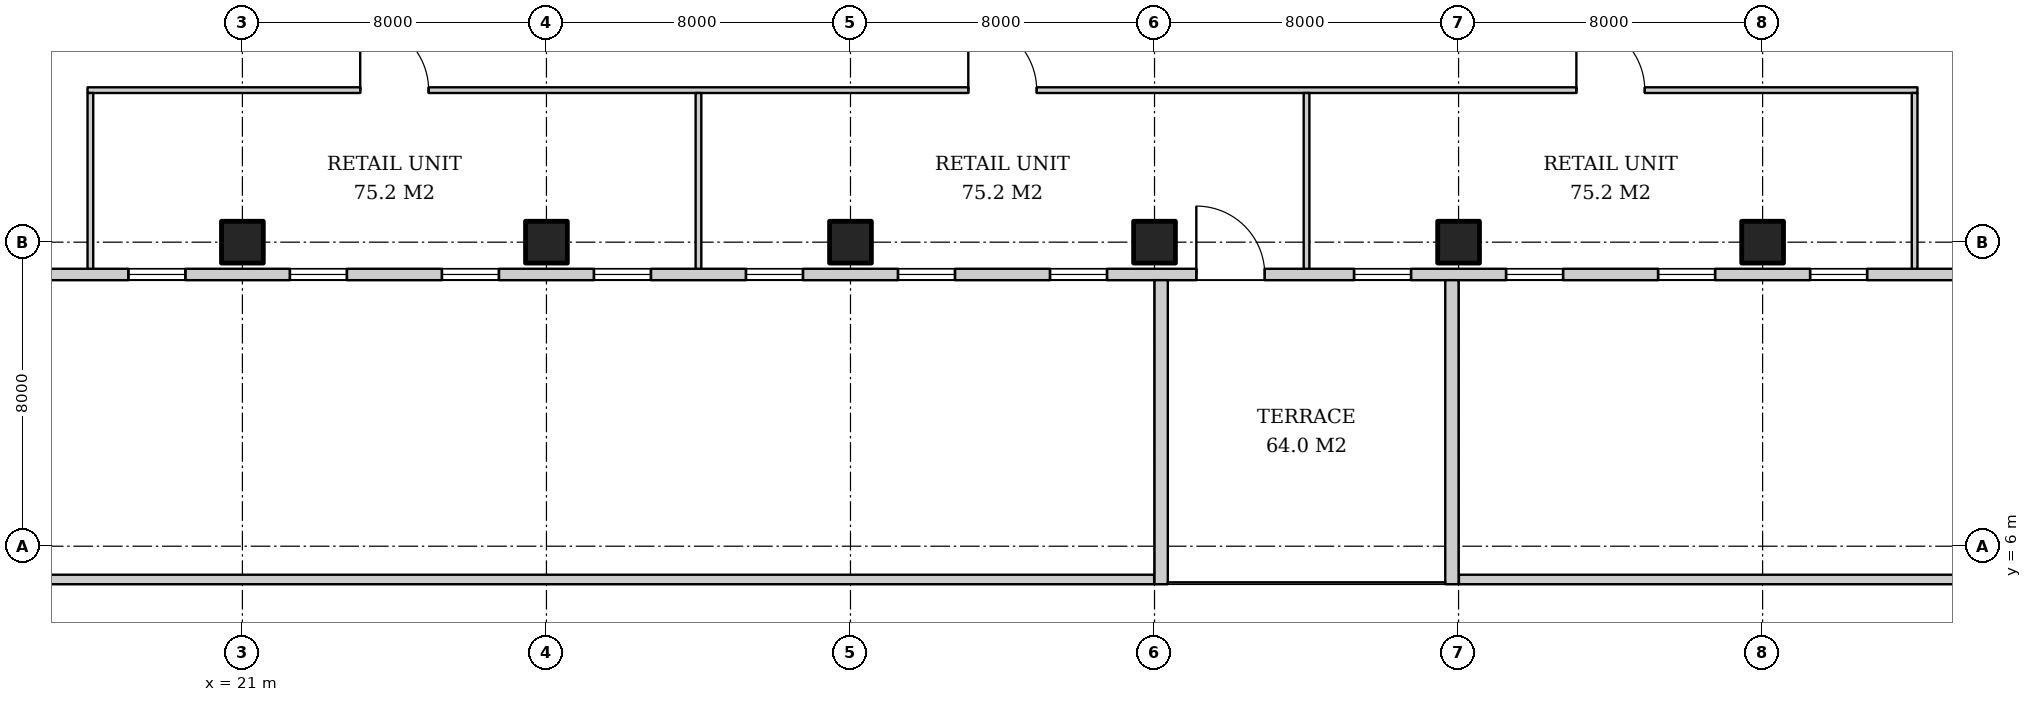
"""IFC4 building model, lengths in metres.
Left out: names, types, materials, properties, quantities, classifications, styles, units other than length and angle.
Written with IfcOpenShell. Run it as: python <this file> out.ifc"""

import sys

from ifc_helpers import new_model, si_unit, direction, frame, frame_2d, origin, origin_2d, place, context, subcontext, project, spatial, rectangle, extrude, element, fill, save


model = new_model("IFC4")
c1 = context("Model", 3, precision=1e-05, world=origin(), true_north=direction((0.0, 1.0)))
c2 = subcontext(c1, "Body", "Model", "MODEL_VIEW")
j1 = project(units=[si_unit("LENGTHUNIT", "METRE"), si_unit("PLANEANGLEUNIT", "RADIAN")], contexts=[c1])
p1 = place(None, origin())
s1 = spatial("IfcSite", under=j1, at=p1, CompositionType="ELEMENT")
p2 = place(p1, origin())
s2 = spatial("IfcBuilding", under=s1, at=p2, CompositionType="ELEMENT")
p3 = place(p2, frame((0.0, 0.0, 6.0)))
s3 = spatial("IfcBuildingStorey", under=s2, at=p3, CompositionType="ELEMENT", Elevation=6.0)
for number, where, z_axis, x_axis in (
    (1, (21.0, 14.0, 0.0), (0.0, 0.0, 1.0), (1.0, 0.0, 0.0)),
    (2, (29.0, 14.0, 0.0), (0.0, 0.0, 1.0), (1.0, 0.0, 0.0)),
    (3, (37.0, 14.0, 0.0), (0.0, 0.0, 1.0), (1.0, 0.0, 0.0)),
    (4, (45.0, 14.0, 0.0), (0.0, 0.0, 1.0), (1.0, 0.0, 0.0)),
    (5, (53.0, 14.0, 0.0), (0.0, 0.0, 1.0), (1.0, 0.0, 0.0)),
    (6, (61.0, 14.0, 0.0), (0.0, 0.0, 1.0), (1.0, 0.0, 0.0)),
):
    element("IfcColumn", number, at=place(p3, frame(where, z_axis=z_axis, x_axis=x_axis)), inside=s3, PredefinedType="COLUMN", context=c2, shape_type="SweptSolid", body=[
        extrude(rectangle(XDim=1.1, YDim=1.1, at=origin_2d()), origin(), (0.0, 0.0, 1.0), 5.0),
    ])
p4 = place(p3, frame((12.0, 13.15, 0.0), z_axis=(0.0, 0.0, 1.0), x_axis=(1.0, 0.0, 0.0)))
e7 = element("IfcWall", 7, at=p4, inside=s3, PredefinedType="SOLIDWALL", context=c2, shape_type="SweptSolid", body=[
    extrude(rectangle(XDim=66.0, YDim=0.3, at=frame_2d((33.0, 0.0))), origin(), (0.0, 0.0, 1.0), 4.7),
])
p5 = place(p4, frame((1.5, 0.0, 0.9)))
e8 = element("IfcOpeningElement", 8, at=p5, cuts=e7, PredefinedType="OPENING", context=c2, shape_type="SweptSolid", body=[
    extrude(rectangle(XDim=1.5, YDim=3.2, at=frame_2d((0.75, 1.6))), frame((0.0, 0.16, 0.0), z_axis=(0.0, -1.0, 0.0), x_axis=(1.0, 0.0, 0.0)), (0.0, 0.0, 1.0), 0.32),
])
p6 = place(p4, frame((6.0, 0.0, 0.9)))
e9 = element("IfcOpeningElement", 9, at=p6, cuts=e7, PredefinedType="OPENING", context=c2, shape_type="SweptSolid", body=[
    extrude(rectangle(XDim=1.5, YDim=3.2, at=frame_2d((0.75, 1.6))), frame((0.0, 0.16, 0.0), z_axis=(0.0, -1.0, 0.0), x_axis=(1.0, 0.0, 0.0)), (0.0, 0.0, 1.0), 0.32),
])
p7 = place(p4, frame((10.25, 0.0, 0.9)))
e10 = element("IfcOpeningElement", 10, at=p7, cuts=e7, PredefinedType="OPENING", context=c2, shape_type="SweptSolid", body=[
    extrude(rectangle(XDim=1.5, YDim=3.2, at=frame_2d((0.75, 1.6))), frame((0.0, 0.16, 0.0), z_axis=(0.0, -1.0, 0.0), x_axis=(1.0, 0.0, 0.0)), (0.0, 0.0, 1.0), 0.32),
])
p8 = place(p4, frame((14.25, 0.0, 0.9)))
e11 = element("IfcOpeningElement", 11, at=p8, cuts=e7, PredefinedType="OPENING", context=c2, shape_type="SweptSolid", body=[
    extrude(rectangle(XDim=1.5, YDim=3.2, at=frame_2d((0.75, 1.6))), frame((0.0, 0.16, 0.0), z_axis=(0.0, -1.0, 0.0), x_axis=(1.0, 0.0, 0.0)), (0.0, 0.0, 1.0), 0.32),
])
p9 = place(p4, frame((18.25, 0.0, 0.9)))
e12 = element("IfcOpeningElement", 12, at=p9, cuts=e7, PredefinedType="OPENING", context=c2, shape_type="SweptSolid", body=[
    extrude(rectangle(XDim=1.5, YDim=3.2, at=frame_2d((0.75, 1.6))), frame((0.0, 0.16, 0.0), z_axis=(0.0, -1.0, 0.0), x_axis=(1.0, 0.0, 0.0)), (0.0, 0.0, 1.0), 0.32),
])
p10 = place(p4, frame((22.25, 0.0, 0.9)))
e13 = element("IfcOpeningElement", 13, at=p10, cuts=e7, PredefinedType="OPENING", context=c2, shape_type="SweptSolid", body=[
    extrude(rectangle(XDim=1.5, YDim=3.2, at=frame_2d((0.75, 1.6))), frame((0.0, 0.16, 0.0), z_axis=(0.0, -1.0, 0.0), x_axis=(1.0, 0.0, 0.0)), (0.0, 0.0, 1.0), 0.32),
])
p11 = place(p4, frame((26.25, 0.0, 0.9)))
e14 = element("IfcOpeningElement", 14, at=p11, cuts=e7, PredefinedType="OPENING", context=c2, shape_type="SweptSolid", body=[
    extrude(rectangle(XDim=1.5, YDim=3.2, at=frame_2d((0.75, 1.6))), frame((0.0, 0.16, 0.0), z_axis=(0.0, -1.0, 0.0), x_axis=(1.0, 0.0, 0.0)), (0.0, 0.0, 1.0), 0.32),
])
p12 = place(p4, frame((30.25, 0.0, 0.9)))
e15 = element("IfcOpeningElement", 15, at=p12, cuts=e7, PredefinedType="OPENING", context=c2, shape_type="SweptSolid", body=[
    extrude(rectangle(XDim=1.5, YDim=3.2, at=frame_2d((0.75, 1.6))), frame((0.0, 0.16, 0.0), z_axis=(0.0, -1.0, 0.0), x_axis=(1.0, 0.0, 0.0)), (0.0, 0.0, 1.0), 0.32),
])
p13 = place(p4, frame((34.1, 0.0, 0.0)))
e16 = element("IfcOpeningElement", 16, at=p13, cuts=e7, PredefinedType="OPENING", context=c2, shape_type="SweptSolid", body=[
    extrude(rectangle(XDim=1.8, YDim=2.4, at=frame_2d((0.9, 1.2))), frame((0.0, 0.16, 0.0), z_axis=(0.0, -1.0, 0.0), x_axis=(1.0, 0.0, 0.0)), (0.0, 0.0, 1.0), 0.32),
])
p14 = place(p4, frame((38.25, 0.0, 0.9)))
e17 = element("IfcOpeningElement", 17, at=p14, cuts=e7, PredefinedType="OPENING", context=c2, shape_type="SweptSolid", body=[
    extrude(rectangle(XDim=1.5, YDim=3.2, at=frame_2d((0.75, 1.6))), frame((0.0, 0.16, 0.0), z_axis=(0.0, -1.0, 0.0), x_axis=(1.0, 0.0, 0.0)), (0.0, 0.0, 1.0), 0.32),
])
p15 = place(p4, frame((42.25, 0.0, 0.9)))
e18 = element("IfcOpeningElement", 18, at=p15, cuts=e7, PredefinedType="OPENING", context=c2, shape_type="SweptSolid", body=[
    extrude(rectangle(XDim=1.5, YDim=3.2, at=frame_2d((0.75, 1.6))), frame((0.0, 0.16, 0.0), z_axis=(0.0, -1.0, 0.0), x_axis=(1.0, 0.0, 0.0)), (0.0, 0.0, 1.0), 0.32),
])
p16 = place(p4, frame((46.25, 0.0, 0.9)))
e19 = element("IfcOpeningElement", 19, at=p16, cuts=e7, PredefinedType="OPENING", context=c2, shape_type="SweptSolid", body=[
    extrude(rectangle(XDim=1.5, YDim=3.2, at=frame_2d((0.75, 1.6))), frame((0.0, 0.16, 0.0), z_axis=(0.0, -1.0, 0.0), x_axis=(1.0, 0.0, 0.0)), (0.0, 0.0, 1.0), 0.32),
])
p17 = place(p4, frame((50.25, 0.0, 0.9)))
e20 = element("IfcOpeningElement", 20, at=p17, cuts=e7, PredefinedType="OPENING", context=c2, shape_type="SweptSolid", body=[
    extrude(rectangle(XDim=1.5, YDim=3.2, at=frame_2d((0.75, 1.6))), frame((0.0, 0.16, 0.0), z_axis=(0.0, -1.0, 0.0), x_axis=(1.0, 0.0, 0.0)), (0.0, 0.0, 1.0), 0.32),
])
p18 = place(p4, frame((54.25, 0.0, 0.9)))
e21 = element("IfcOpeningElement", 21, at=p18, cuts=e7, PredefinedType="OPENING", context=c2, shape_type="SweptSolid", body=[
    extrude(rectangle(XDim=1.5, YDim=3.2, at=frame_2d((0.75, 1.6))), frame((0.0, 0.16, 0.0), z_axis=(0.0, -1.0, 0.0), x_axis=(1.0, 0.0, 0.0)), (0.0, 0.0, 1.0), 0.32),
])
p19 = place(p4, frame((58.5, 0.0, 0.9)))
e22 = element("IfcOpeningElement", 22, at=p19, cuts=e7, PredefinedType="OPENING", context=c2, shape_type="SweptSolid", body=[
    extrude(rectangle(XDim=1.5, YDim=3.2, at=frame_2d((0.75, 1.6))), frame((0.0, 0.16, 0.0), z_axis=(0.0, -1.0, 0.0), x_axis=(1.0, 0.0, 0.0)), (0.0, 0.0, 1.0), 0.32),
])
p20 = place(p4, frame((63.0, 0.0, 0.9)))
e23 = element("IfcOpeningElement", 23, at=p20, cuts=e7, PredefinedType="OPENING", context=c2, shape_type="SweptSolid", body=[
    extrude(rectangle(XDim=1.5, YDim=3.2, at=frame_2d((0.75, 1.6))), frame((0.0, 0.16, 0.0), z_axis=(0.0, -1.0, 0.0), x_axis=(1.0, 0.0, 0.0)), (0.0, 0.0, 1.0), 0.32),
])
p21 = place(p3, frame((4.0, 5.125, 0.0), z_axis=(0.0, 0.0, 1.0), x_axis=(1.0, 0.0, 0.0)))
e24 = element("IfcWall", 24, at=p21, inside=s3, PredefinedType="PARAPET", context=c2, shape_type="SweptSolid", body=[
    extrude(rectangle(XDim=40.99, YDim=0.25, at=frame_2d((20.495, 0.0))), origin(), (0.0, 0.0, 1.0), 1.1),
])
p22 = place(p3, frame((53.01, 5.125, 0.0), z_axis=(0.0, 0.0, 1.0), x_axis=(1.0, 0.0, 0.0)))
e25 = element("IfcWall", 25, at=p22, inside=s3, PredefinedType="PARAPET", context=c2, shape_type="SweptSolid", body=[
    extrude(rectangle(XDim=24.99, YDim=0.25, at=frame_2d((12.495, 0.0))), origin(), (0.0, 0.0, 1.0), 1.1),
])
for number, where, z_axis, x_axis in (
    (26, (45.175, 5.0, 0.0), (0.0, 0.0, 1.0), (0.0, 1.0, 0.0)),
    (27, (52.825, 5.0, 0.0), (0.0, 0.0, 1.0), (0.0, 1.0, 0.0)),
):
    element("IfcWall", number, at=place(p3, frame(where, z_axis=z_axis, x_axis=x_axis)), inside=s3, PredefinedType="PARAPET", context=c2, shape_type="SweptSolid", body=[
        extrude(rectangle(XDim=8.0, YDim=0.35, at=frame_2d((4.0, 0.0))), origin(), (0.0, 0.0, 1.0), 1.1),
    ])
p23 = place(p3, frame((16.925, 18.0, 0.0), z_axis=(0.0, 0.0, 1.0), x_axis=(1.0, 0.0, 0.0)))
e28 = element("IfcWall", 28, at=p23, inside=s3, PredefinedType="PARTITIONING", context=c2, shape_type="SweptSolid", body=[
    extrude(rectangle(XDim=48.15, YDim=0.15, at=frame_2d((24.075, 0.0))), origin(), (0.0, 0.0, 1.0), 3.2),
])
p24 = place(p23, frame((7.175, 0.0, 0.0)))
e29 = element("IfcOpeningElement", 29, at=p24, cuts=e28, PredefinedType="OPENING", context=c2, shape_type="SweptSolid", body=[
    extrude(rectangle(XDim=1.8, YDim=2.4, at=frame_2d((0.9, 1.2))), frame((0.0, 0.085, 0.0), z_axis=(0.0, -1.0, 0.0), x_axis=(1.0, 0.0, 0.0)), (0.0, 0.0, 1.0), 0.17),
])
p25 = place(p23, frame((23.175, 0.0, 0.0)))
e30 = element("IfcOpeningElement", 30, at=p25, cuts=e28, PredefinedType="OPENING", context=c2, shape_type="SweptSolid", body=[
    extrude(rectangle(XDim=1.8, YDim=2.4, at=frame_2d((0.9, 1.2))), frame((0.0, 0.085, 0.0), z_axis=(0.0, -1.0, 0.0), x_axis=(1.0, 0.0, 0.0)), (0.0, 0.0, 1.0), 0.17),
])
p26 = place(p23, frame((39.175, 0.0, 0.0)))
e31 = element("IfcOpeningElement", 31, at=p26, cuts=e28, PredefinedType="OPENING", context=c2, shape_type="SweptSolid", body=[
    extrude(rectangle(XDim=1.8, YDim=2.4, at=frame_2d((0.9, 1.2))), frame((0.0, 0.085, 0.0), z_axis=(0.0, -1.0, 0.0), x_axis=(1.0, 0.0, 0.0)), (0.0, 0.0, 1.0), 0.17),
])
for number, where, z_axis, x_axis in (
    (32, (17.0, 17.925, 0.0), (0.0, 0.0, 1.0), (0.0, -1.0, 0.0)),
    (33, (33.0, 17.925, 0.0), (0.0, 0.0, 1.0), (0.0, -1.0, 0.0)),
    (34, (49.0, 17.925, 0.0), (0.0, 0.0, 1.0), (0.0, -1.0, 0.0)),
    (35, (65.0, 17.925, 0.0), (0.0, 0.0, 1.0), (0.0, -1.0, 0.0)),
):
    element("IfcWall", number, at=place(p3, frame(where, z_axis=z_axis, x_axis=x_axis)), inside=s3, PredefinedType="PARTITIONING", context=c2, shape_type="SweptSolid", body=[
        extrude(rectangle(XDim=4.625, YDim=0.15, at=frame_2d((2.312, 0.0))), origin(), (0.0, 0.0, 1.0), 3.2),
    ])
p27 = place(p6, origin())
e36 = element("IfcWindow", 36, at=p27, inside=s3, PartitioningType="SINGLE_PANEL", PredefinedType="WINDOW", context=c2, shape_type="SweptSolid", body=[
    extrude(rectangle(XDim=1.5, YDim=3.2, at=frame_2d((0.75, 1.6))), frame((0.0, 0.03, 0.0), z_axis=(0.0, -1.0, 0.0), x_axis=(1.0, 0.0, 0.0)), (0.0, 0.0, 1.0), 0.06),
])
fill(e9, e36)
p28 = place(p7, origin())
e37 = element("IfcWindow", 37, at=p28, inside=s3, PartitioningType="SINGLE_PANEL", PredefinedType="WINDOW", context=c2, shape_type="SweptSolid", body=[
    extrude(rectangle(XDim=1.5, YDim=3.2, at=frame_2d((0.75, 1.6))), frame((0.0, 0.03, 0.0), z_axis=(0.0, -1.0, 0.0), x_axis=(1.0, 0.0, 0.0)), (0.0, 0.0, 1.0), 0.06),
])
fill(e10, e37)
p29 = place(p8, origin())
e38 = element("IfcWindow", 38, at=p29, inside=s3, PartitioningType="SINGLE_PANEL", PredefinedType="WINDOW", context=c2, shape_type="SweptSolid", body=[
    extrude(rectangle(XDim=1.5, YDim=3.2, at=frame_2d((0.75, 1.6))), frame((0.0, 0.03, 0.0), z_axis=(0.0, -1.0, 0.0), x_axis=(1.0, 0.0, 0.0)), (0.0, 0.0, 1.0), 0.06),
])
fill(e11, e38)
p30 = place(p9, origin())
e39 = element("IfcWindow", 39, at=p30, inside=s3, PartitioningType="SINGLE_PANEL", PredefinedType="WINDOW", context=c2, shape_type="SweptSolid", body=[
    extrude(rectangle(XDim=1.5, YDim=3.2, at=frame_2d((0.75, 1.6))), frame((0.0, 0.03, 0.0), z_axis=(0.0, -1.0, 0.0), x_axis=(1.0, 0.0, 0.0)), (0.0, 0.0, 1.0), 0.06),
])
fill(e12, e39)
p31 = place(p10, origin())
e40 = element("IfcWindow", 40, at=p31, inside=s3, PartitioningType="SINGLE_PANEL", PredefinedType="WINDOW", context=c2, shape_type="SweptSolid", body=[
    extrude(rectangle(XDim=1.5, YDim=3.2, at=frame_2d((0.75, 1.6))), frame((0.0, 0.03, 0.0), z_axis=(0.0, -1.0, 0.0), x_axis=(1.0, 0.0, 0.0)), (0.0, 0.0, 1.0), 0.06),
])
fill(e13, e40)
p32 = place(p11, origin())
e41 = element("IfcWindow", 41, at=p32, inside=s3, PartitioningType="SINGLE_PANEL", PredefinedType="WINDOW", context=c2, shape_type="SweptSolid", body=[
    extrude(rectangle(XDim=1.5, YDim=3.2, at=frame_2d((0.75, 1.6))), frame((0.0, 0.03, 0.0), z_axis=(0.0, -1.0, 0.0), x_axis=(1.0, 0.0, 0.0)), (0.0, 0.0, 1.0), 0.06),
])
fill(e14, e41)
p33 = place(p12, origin())
e42 = element("IfcWindow", 42, at=p33, inside=s3, PartitioningType="SINGLE_PANEL", PredefinedType="WINDOW", context=c2, shape_type="SweptSolid", body=[
    extrude(rectangle(XDim=1.5, YDim=3.2, at=frame_2d((0.75, 1.6))), frame((0.0, 0.03, 0.0), z_axis=(0.0, -1.0, 0.0), x_axis=(1.0, 0.0, 0.0)), (0.0, 0.0, 1.0), 0.06),
])
fill(e15, e42)
p34 = place(p13, origin())
e43 = element("IfcDoor", 43, at=p34, inside=s3, OperationType="DOUBLE_DOOR_SINGLE_SWING", PredefinedType="DOOR", context=c2, shape_type="SweptSolid", body=[
    extrude(rectangle(XDim=1.8, YDim=2.4, at=frame_2d((0.9, 1.2))), frame((0.0, 0.025, 0.0), z_axis=(0.0, -1.0, 0.0), x_axis=(1.0, 0.0, 0.0)), (0.0, 0.0, 1.0), 0.05),
])
fill(e16, e43)
p35 = place(p14, origin())
e44 = element("IfcWindow", 44, at=p35, inside=s3, PartitioningType="SINGLE_PANEL", PredefinedType="WINDOW", context=c2, shape_type="SweptSolid", body=[
    extrude(rectangle(XDim=1.5, YDim=3.2, at=frame_2d((0.75, 1.6))), frame((0.0, 0.03, 0.0), z_axis=(0.0, -1.0, 0.0), x_axis=(1.0, 0.0, 0.0)), (0.0, 0.0, 1.0), 0.06),
])
fill(e17, e44)
p36 = place(p15, origin())
e45 = element("IfcWindow", 45, at=p36, inside=s3, PartitioningType="SINGLE_PANEL", PredefinedType="WINDOW", context=c2, shape_type="SweptSolid", body=[
    extrude(rectangle(XDim=1.5, YDim=3.2, at=frame_2d((0.75, 1.6))), frame((0.0, 0.03, 0.0), z_axis=(0.0, -1.0, 0.0), x_axis=(1.0, 0.0, 0.0)), (0.0, 0.0, 1.0), 0.06),
])
fill(e18, e45)
p37 = place(p16, origin())
e46 = element("IfcWindow", 46, at=p37, inside=s3, PartitioningType="SINGLE_PANEL", PredefinedType="WINDOW", context=c2, shape_type="SweptSolid", body=[
    extrude(rectangle(XDim=1.5, YDim=3.2, at=frame_2d((0.75, 1.6))), frame((0.0, 0.03, 0.0), z_axis=(0.0, -1.0, 0.0), x_axis=(1.0, 0.0, 0.0)), (0.0, 0.0, 1.0), 0.06),
])
fill(e19, e46)
p38 = place(p17, origin())
e47 = element("IfcWindow", 47, at=p38, inside=s3, PartitioningType="SINGLE_PANEL", PredefinedType="WINDOW", context=c2, shape_type="SweptSolid", body=[
    extrude(rectangle(XDim=1.5, YDim=3.2, at=frame_2d((0.75, 1.6))), frame((0.0, 0.03, 0.0), z_axis=(0.0, -1.0, 0.0), x_axis=(1.0, 0.0, 0.0)), (0.0, 0.0, 1.0), 0.06),
])
fill(e20, e47)
p39 = place(p24, origin())
e48 = element("IfcDoor", 48, at=p39, inside=s3, OperationType="DOUBLE_DOOR_SINGLE_SWING", PredefinedType="DOOR", context=c2, shape_type="SweptSolid", body=[
    extrude(rectangle(XDim=1.8, YDim=2.4, at=frame_2d((0.9, 1.2))), frame((0.0, 0.025, 0.0), z_axis=(0.0, -1.0, 0.0), x_axis=(1.0, 0.0, 0.0)), (0.0, 0.0, 1.0), 0.05),
])
fill(e29, e48)
p40 = place(p25, origin())
e49 = element("IfcDoor", 49, at=p40, inside=s3, OperationType="DOUBLE_DOOR_SINGLE_SWING", PredefinedType="DOOR", context=c2, shape_type="SweptSolid", body=[
    extrude(rectangle(XDim=1.8, YDim=2.4, at=frame_2d((0.9, 1.2))), frame((0.0, 0.025, 0.0), z_axis=(0.0, -1.0, 0.0), x_axis=(1.0, 0.0, 0.0)), (0.0, 0.0, 1.0), 0.05),
])
fill(e30, e49)
p41 = place(p26, origin())
e50 = element("IfcDoor", 50, at=p41, inside=s3, OperationType="DOUBLE_DOOR_SINGLE_SWING", PredefinedType="DOOR", context=c2, shape_type="SweptSolid", body=[
    extrude(rectangle(XDim=1.8, YDim=2.4, at=frame_2d((0.9, 1.2))), frame((0.0, 0.025, 0.0), z_axis=(0.0, -1.0, 0.0), x_axis=(1.0, 0.0, 0.0)), (0.0, 0.0, 1.0), 0.05),
])
fill(e31, e50)
save(model, sys.argv[1])
